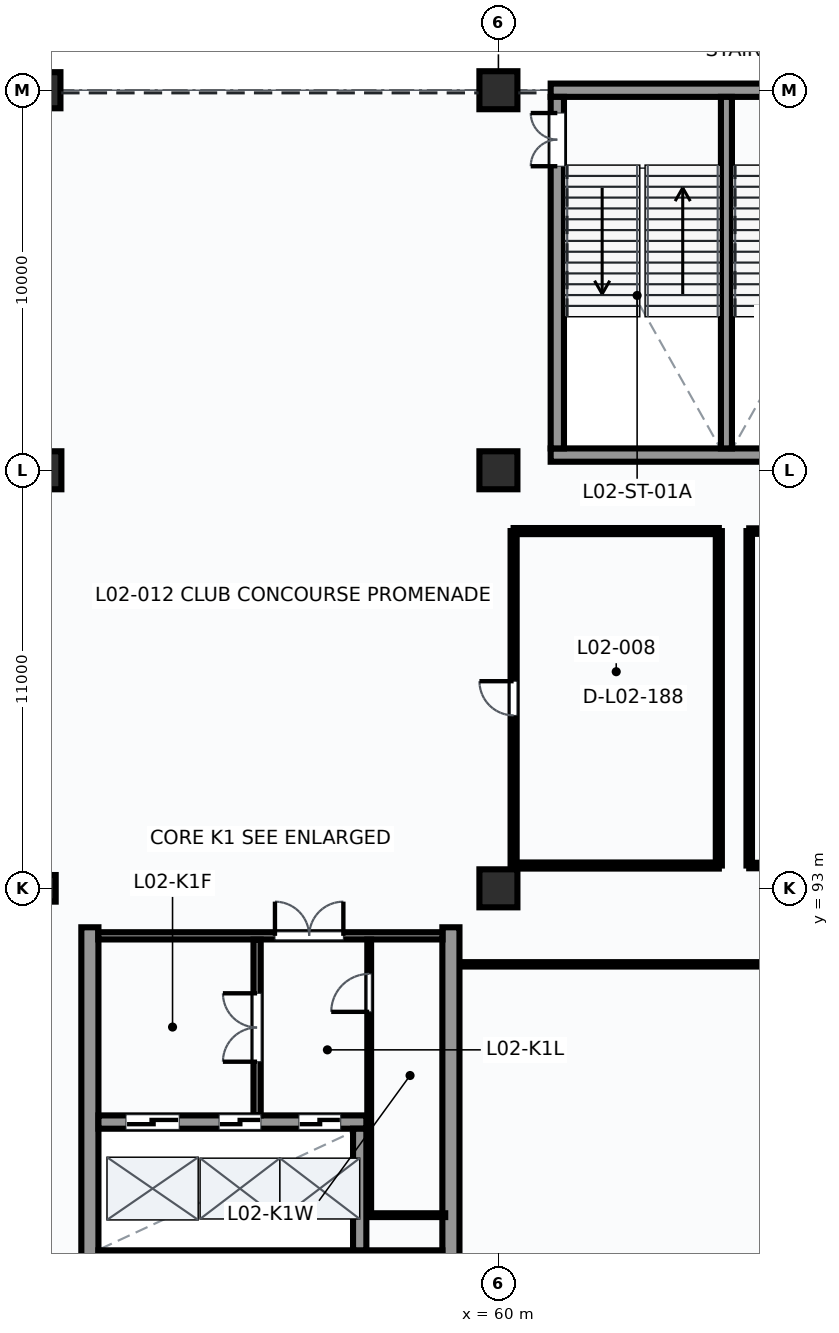
"""IFC4 building model, lengths in metres.
Left out: names, types, materials, properties, quantities, classifications, styles, units other than length and angle.
Written with IfcOpenShell. Run it as: python <this file> out.ifc"""

import sys

from ifc_helpers import new_model, si_unit, direction, frame, frame_2d, origin, origin_2d, place, context, subcontext, project, spatial, rectangle, extrude, element, fill, save


model = new_model("IFC4")
c1 = context("Model", 3, precision=1e-05, world=origin(), true_north=direction((0.0, 1.0)))
c2 = subcontext(c1, "Body", "Model", "MODEL_VIEW")
j1 = project(units=[si_unit("LENGTHUNIT", "METRE"), si_unit("PLANEANGLEUNIT", "RADIAN")], contexts=[c1])
p1 = place(None, origin())
s1 = spatial("IfcSite", under=j1, at=p1, CompositionType="ELEMENT")
p2 = place(p1, origin())
s2 = spatial("IfcBuilding", under=s1, at=p2, CompositionType="ELEMENT")
p3 = place(p2, frame((0.0, 0.0, 10.2)))
s3 = spatial("IfcBuildingStorey", under=s2, at=p3, CompositionType="ELEMENT", Elevation=10.2)
p4 = place(p3, frame((48.0, 93.0, 0.0), z_axis=(0.0, 0.0, 1.0), x_axis=(1.0, 0.0, 0.0)))
e1 = element("IfcColumn", 1, at=p4, inside=s3, PredefinedType="COLUMN", context=c2, shape_type="SweptSolid", body=[
    extrude(rectangle(XDim=0.7, YDim=0.7, at=origin_2d()), origin(), (0.0, 0.0, 1.0), 4.5),
])
p5 = place(p3, frame((48.0, 104.0, 0.0), z_axis=(0.0, 0.0, 1.0), x_axis=(1.0, 0.0, 0.0)))
e2 = element("IfcColumn", 2, at=p5, inside=s3, PredefinedType="COLUMN", context=c2, shape_type="SweptSolid", body=[
    extrude(rectangle(XDim=1.0, YDim=1.0, at=origin_2d()), origin(), (0.0, 0.0, 1.0), 4.5),
])
p6 = place(p3, frame((48.0, 114.0, 0.0), z_axis=(0.0, 0.0, 1.0), x_axis=(1.0, 0.0, 0.0)))
e3 = element("IfcColumn", 3, at=p6, inside=s3, PredefinedType="COLUMN", context=c2, shape_type="SweptSolid", body=[
    extrude(rectangle(XDim=0.95, YDim=0.95, at=origin_2d()), origin(), (0.0, 0.0, 1.0), 4.5),
])
for number, where, z_axis, x_axis in (
    (4, (60.0, 93.0, 0.0), (0.0, 0.0, 1.0), (1.0, 0.0, 0.0)),
    (5, (60.0, 104.0, 0.0), (0.0, 0.0, 1.0), (1.0, 0.0, 0.0)),
    (6, (60.0, 114.0, 0.0), (0.0, 0.0, 1.0), (1.0, 0.0, 0.0)),
):
    element("IfcColumn", number, at=place(p3, frame(where, z_axis=z_axis, x_axis=x_axis)), inside=s3, PredefinedType="COLUMN", context=c2, shape_type="SweptSolid", body=[
        extrude(rectangle(XDim=1.0, YDim=1.0, at=origin_2d()), origin(), (0.0, 0.0, 1.0), 4.5),
    ])
p7 = place(p3, frame((61.375, 104.4, 0.0), z_axis=(0.0, 0.0, 1.0), x_axis=(1.0, 0.0, 0.0)))
e7 = element("IfcWall", 7, at=p7, inside=s3, PredefinedType="SHEAR", context=c2, shape_type="SweptSolid", body=[
    extrude(rectangle(XDim=9.25, YDim=0.35, at=frame_2d((4.625, 0.0))), origin(), (0.0, 0.0, 1.0), 4.5),
])
p8 = place(p3, frame((61.375, 114.0, 0.0), z_axis=(0.0, 0.0, 1.0), x_axis=(1.0, 0.0, 0.0)))
e8 = element("IfcWall", 8, at=p8, inside=s3, PredefinedType="SHEAR", context=c2, shape_type="SweptSolid", body=[
    extrude(rectangle(XDim=9.25, YDim=0.35, at=frame_2d((4.625, 0.0))), origin(), (0.0, 0.0, 1.0), 3.586),
])
p9 = place(p3, frame((61.55, 104.575, 0.0), z_axis=(0.0, 0.0, 1.0), x_axis=(0.0, 1.0, 0.0)))
e9 = element("IfcWall", 9, at=p9, inside=s3, PredefinedType="SHEAR", context=c2, shape_type="SweptSolid", body=[
    extrude(rectangle(XDim=9.25, YDim=0.35, at=frame_2d((4.625, 0.0))), origin(), (0.0, 0.0, 1.0), 4.5),
])
p10 = place(p9, frame((7.425, 0.0, 0.0)))
e10 = element("IfcOpeningElement", 10, at=p10, cuts=e9, PredefinedType="OPENING", context=c2, shape_type="SweptSolid", body=[
    extrude(rectangle(XDim=1.4, YDim=2.2, at=frame_2d((0.7, 1.1))), frame((0.0, 0.185, 0.0), z_axis=(0.0, -1.0, 0.0), x_axis=(1.0, 0.0, 0.0)), (0.0, 0.0, 1.0), 0.37),
])
p11 = place(p3, frame((66.0, 104.575, 0.0), z_axis=(0.0, 0.0, 1.0), x_axis=(0.0, 1.0, 0.0)))
e11 = element("IfcWall", 11, at=p11, inside=s3, PredefinedType="SHEAR", context=c2, shape_type="SweptSolid", body=[
    extrude(rectangle(XDim=9.25, YDim=0.29, at=frame_2d((4.625, 0.0))), origin(), (0.0, 0.0, 1.0), 4.5),
])
for number, where, z_axis, x_axis in (
    (12, (49.25, 83.025, 0.0), (0.0, 0.0, 1.0), (0.0, 1.0, 0.0)),
    (13, (58.75, 83.025, 0.0), (0.0, 0.0, 1.0), (0.0, 1.0, 0.0)),
):
    element("IfcWall", number, at=place(p3, frame(where, z_axis=z_axis, x_axis=x_axis)), inside=s3, PredefinedType="SHEAR", context=c2, shape_type="SweptSolid", body=[
        extrude(rectangle(XDim=8.95, YDim=0.45, at=frame_2d((4.475, 0.0))), origin(), (0.0, 0.0, 1.0), 4.5),
    ])
p12 = place(p3, frame((49.475, 83.25, 0.0), z_axis=(0.0, 0.0, 1.0), x_axis=(1.0, 0.0, 0.0)))
e14 = element("IfcWall", 14, at=p12, inside=s3, PredefinedType="SHEAR", context=c2, shape_type="SweptSolid", body=[
    extrude(rectangle(XDim=9.05, YDim=0.45, at=frame_2d((4.525, 0.0))), origin(), (0.0, 0.0, 1.0), 4.5),
])
p13 = place(p3, frame((49.475, 86.85, 0.0), z_axis=(0.0, 0.0, 1.0), x_axis=(1.0, 0.0, 0.0)))
e15 = element("IfcWall", 15, at=p13, inside=s3, PredefinedType="SHEAR", context=c2, shape_type="SweptSolid", body=[
    extrude(rectangle(XDim=7.05, YDim=0.35, at=frame_2d((3.525, 0.0))), origin(), (0.0, 0.0, 1.0), 4.5),
])
p14 = place(p13, frame((0.725, 0.0, 0.0)))
e16 = element("IfcOpeningElement", 16, at=p14, cuts=e15, PredefinedType="OPENING", context=c2, shape_type="SweptSolid", body=[
    extrude(rectangle(XDim=1.4, YDim=2.3, at=frame_2d((0.7, 1.15))), frame((0.0, 0.185, 0.0), z_axis=(0.0, -1.0, 0.0), x_axis=(1.0, 0.0, 0.0)), (0.0, 0.0, 1.0), 0.37),
])
p15 = place(p13, frame((3.175, 0.0, 0.0)))
e17 = element("IfcOpeningElement", 17, at=p15, cuts=e15, PredefinedType="OPENING", context=c2, shape_type="SweptSolid", body=[
    extrude(rectangle(XDim=1.1, YDim=2.2, at=frame_2d((0.55, 1.1))), frame((0.0, 0.185, 0.0), z_axis=(0.0, -1.0, 0.0), x_axis=(1.0, 0.0, 0.0)), (0.0, 0.0, 1.0), 0.37),
])
p16 = place(p13, frame((5.275, 0.0, 0.0)))
e18 = element("IfcOpeningElement", 18, at=p16, cuts=e15, PredefinedType="OPENING", context=c2, shape_type="SweptSolid", body=[
    extrude(rectangle(XDim=1.1, YDim=2.2, at=frame_2d((0.55, 1.1))), frame((0.0, 0.185, 0.0), z_axis=(0.0, -1.0, 0.0), x_axis=(1.0, 0.0, 0.0)), (0.0, 0.0, 1.0), 0.37),
])
p17 = place(p3, frame((56.35, 83.475, 0.0), z_axis=(0.0, 0.0, 1.0), x_axis=(0.0, 1.0, 0.0)))
e19 = element("IfcWall", 19, at=p17, inside=s3, PredefinedType="SHEAR", context=c2, shape_type="SweptSolid", body=[
    extrude(rectangle(XDim=3.2, YDim=0.35, at=frame_2d((1.6, 0.0))), origin(), (0.0, 0.0, 1.0), 4.5),
])
p18 = place(p3, frame((49.47, 91.75, 0.0), z_axis=(0.0, 0.0, 1.0), x_axis=(1.0, 0.0, 0.0)))
e20 = element("IfcWall", 20, at=p18, inside=s3, PredefinedType="PARTITIONING", context=c2, shape_type="SweptSolid", body=[
    extrude(rectangle(XDim=9.06, YDim=0.19, at=frame_2d((4.53, 0.0))), origin(), (0.0, 0.0, 1.0), 4.15),
])
p19 = place(p18, frame((4.65, 0.0, 0.0)))
e21 = element("IfcOpeningElement", 21, at=p19, cuts=e20, PredefinedType="OPENING", context=c2, shape_type="SweptSolid", body=[
    extrude(rectangle(XDim=1.8, YDim=2.3, at=frame_2d((0.9, 1.15))), frame((0.0, 0.105, 0.0), z_axis=(0.0, -1.0, 0.0), x_axis=(1.0, 0.0, 0.0)), (0.0, 0.0, 1.0), 0.21),
])
p20 = place(p3, frame((53.65, 87.025, 0.0), z_axis=(0.0, 0.0, 1.0), x_axis=(0.0, 1.0, 0.0)))
e22 = element("IfcWall", 22, at=p20, inside=s3, PredefinedType="PARTITIONING", context=c2, shape_type="SweptSolid", body=[
    extrude(rectangle(XDim=4.625, YDim=0.19, at=frame_2d((2.312, 0.0))), origin(), (0.0, 0.0, 1.0), 4.15),
])
p21 = place(p20, frame((1.413, 0.0, 0.0)))
e23 = element("IfcOpeningElement", 23, at=p21, cuts=e22, PredefinedType="OPENING", context=c2, shape_type="SweptSolid", body=[
    extrude(rectangle(XDim=1.8, YDim=2.2, at=frame_2d((0.9, 1.1))), frame((0.0, 0.105, 0.0), z_axis=(0.0, -1.0, 0.0), x_axis=(1.0, 0.0, 0.0)), (0.0, 0.0, 1.0), 0.21),
])
p22 = place(p3, frame((56.6, 84.4, 0.0), z_axis=(0.0, 0.0, 1.0), x_axis=(0.0, 1.0, 0.0)))
e24 = element("IfcWall", 24, at=p22, inside=s3, PredefinedType="PARTITIONING", context=c2, shape_type="SweptSolid", body=[
    extrude(rectangle(XDim=7.25, YDim=0.1, at=frame_2d((3.625, 0.0))), origin(), (0.0, 0.0, 1.0), 4.15),
])
p23 = place(p22, frame((5.35, 0.0, 0.0)))
e25 = element("IfcOpeningElement", 25, at=p23, cuts=e24, PredefinedType="OPENING", context=c2, shape_type="SweptSolid", body=[
    extrude(rectangle(XDim=1.0, YDim=2.1, at=frame_2d((0.5, 1.05))), frame((0.0, 0.06, 0.0), z_axis=(0.0, -1.0, 0.0), x_axis=(1.0, 0.0, 0.0)), (0.0, 0.0, 1.0), 0.12),
])
p24 = place(p3, frame((56.6, 84.4, 0.0), z_axis=(0.0, 0.0, 1.0), x_axis=(1.0, 0.0, 0.0)))
e26 = element("IfcWall", 26, at=p24, inside=s3, PredefinedType="PARTITIONING", context=c2, shape_type="SweptSolid", body=[
    extrude(rectangle(XDim=2.0, YDim=0.1, at=frame_2d((1.0, 0.0))), origin(), (0.0, 0.0, 1.0), 4.15),
])
p25 = place(p3, frame((59.0, 91.0, 0.0), z_axis=(0.0, 0.0, 1.0), x_axis=(1.0, 0.0, 0.0)))
e27 = element("IfcWall", 27, at=p25, inside=s3, PredefinedType="PARTITIONING", context=c2, shape_type="SweptSolid", body=[
    extrude(rectangle(XDim=9.0, YDim=0.115, at=frame_2d((4.5, 0.0))), origin(), (0.0, 0.0, 1.0), 3.13),
])
p26 = place(p3, frame((65.8, 102.4, 0.0), z_axis=(0.0, 0.0, 1.0), x_axis=(0.0, -1.0, 0.0)))
e28 = element("IfcWall", 28, at=p26, inside=s3, PredefinedType="PARTITIONING", context=c2, shape_type="SweptSolid", body=[
    extrude(rectangle(XDim=8.8, YDim=0.16, at=frame_2d((4.4, 0.0))), origin(), (0.0, 0.0, 1.0), 3.82),
])
p27 = place(p3, frame((65.8, 93.6, 0.0), z_axis=(0.0, 0.0, 1.0), x_axis=(-1.0, 0.0, 0.0)))
e29 = element("IfcWall", 29, at=p27, inside=s3, PredefinedType="PARTITIONING", context=c2, shape_type="SweptSolid", body=[
    extrude(rectangle(XDim=5.4, YDim=0.16, at=frame_2d((2.7, 0.0))), origin(), (0.0, 0.0, 1.0), 4.15),
])
p28 = place(p3, frame((60.4, 93.6, 0.0), z_axis=(0.0, 0.0, 1.0), x_axis=(0.0, 1.0, 0.0)))
e30 = element("IfcWall", 30, at=p28, inside=s3, PredefinedType="PARTITIONING", context=c2, shape_type="SweptSolid", body=[
    extrude(rectangle(XDim=8.8, YDim=0.16, at=frame_2d((4.4, 0.0))), origin(), (0.0, 0.0, 1.0), 3.82),
])
p29 = place(p28, frame((3.95, 0.0, 0.0)))
e31 = element("IfcOpeningElement", 31, at=p29, cuts=e30, PredefinedType="OPENING", context=c2, shape_type="SweptSolid", body=[
    extrude(rectangle(XDim=0.9, YDim=2.1, at=frame_2d((0.45, 1.05))), frame((0.0, 0.09, 0.0), z_axis=(0.0, -1.0, 0.0), x_axis=(1.0, 0.0, 0.0)), (0.0, 0.0, 1.0), 0.18),
])
p30 = place(p3, frame((60.4, 102.4, 0.0), z_axis=(0.0, 0.0, 1.0), x_axis=(1.0, 0.0, 0.0)))
e32 = element("IfcWall", 32, at=p30, inside=s3, PredefinedType="PARTITIONING", context=c2, shape_type="SweptSolid", body=[
    extrude(rectangle(XDim=5.4, YDim=0.16, at=frame_2d((2.7, 0.0))), origin(), (0.0, 0.0, 1.0), 4.15),
])
p31 = place(p3, frame((72.0, 93.6, 0.0), z_axis=(0.0, 0.0, 1.0), x_axis=(-1.0, 0.0, 0.0)))
e33 = element("IfcWall", 33, at=p31, inside=s3, PredefinedType="PARTITIONING", context=c2, shape_type="SweptSolid", body=[
    extrude(rectangle(XDim=5.4, YDim=0.145, at=frame_2d((2.7, 0.0))), origin(), (0.0, 0.0, 1.0), 3.38),
])
p32 = place(p31, frame((2.25, 0.0, 0.0)))
e34 = element("IfcOpeningElement", 34, at=p32, cuts=e33, PredefinedType="OPENING", context=c2, shape_type="SweptSolid", body=[
    extrude(rectangle(XDim=0.9, YDim=2.1, at=frame_2d((0.45, 1.05))), frame((0.0, 0.083, 0.0), z_axis=(0.0, -1.0, 0.0), x_axis=(1.0, 0.0, 0.0)), (0.0, 0.0, 1.0), 0.165),
])
p33 = place(p3, frame((66.6, 93.6, 0.0), z_axis=(0.0, 0.0, 1.0), x_axis=(0.0, 1.0, 0.0)))
e35 = element("IfcWall", 35, at=p33, inside=s3, PredefinedType="PARTITIONING", context=c2, shape_type="SweptSolid", body=[
    extrude(rectangle(XDim=8.8, YDim=0.145, at=frame_2d((4.4, 0.0))), origin(), (0.0, 0.0, 1.0), 3.82),
])
p34 = place(p3, frame((66.6, 102.4, 0.0), z_axis=(0.0, 0.0, 1.0), x_axis=(1.0, 0.0, 0.0)))
e36 = element("IfcWall", 36, at=p34, inside=s3, PredefinedType="PARTITIONING", context=c2, shape_type="SweptSolid", body=[
    extrude(rectangle(XDim=5.4, YDim=0.145, at=frame_2d((2.7, 0.0))), origin(), (0.0, 0.0, 1.0), 3.38),
])
p35 = place(p10, frame((1.4, 0.0, 0.0), z_axis=(0.0, 0.0, 1.0), x_axis=(-1.0, 0.0, 0.0)))
e37 = element("IfcDoor", 37, at=p35, inside=s3, OperationType="DOUBLE_DOOR_SINGLE_SWING", PredefinedType="DOOR", context=c2, shape_type="SweptSolid", body=[
    extrude(rectangle(XDim=1.4, YDim=2.2, at=frame_2d((0.7, 1.1))), frame((0.0, 0.025, 0.0), z_axis=(0.0, -1.0, 0.0), x_axis=(1.0, 0.0, 0.0)), (0.0, 0.0, 1.0), 0.05),
])
fill(e10, e37)
p36 = place(p14, origin())
e38 = element("IfcDoor", 38, at=p36, inside=s3, OperationType="SLIDING_TO_LEFT", PredefinedType="DOOR", context=c2, shape_type="SweptSolid", body=[
    extrude(rectangle(XDim=1.4, YDim=2.3, at=frame_2d((0.7, 1.15))), frame((0.0, 0.025, 0.0), z_axis=(0.0, -1.0, 0.0), x_axis=(1.0, 0.0, 0.0)), (0.0, 0.0, 1.0), 0.05),
])
fill(e16, e38)
p37 = place(p15, origin())
e39 = element("IfcDoor", 39, at=p37, inside=s3, OperationType="SLIDING_TO_LEFT", PredefinedType="DOOR", context=c2, shape_type="SweptSolid", body=[
    extrude(rectangle(XDim=1.1, YDim=2.2, at=frame_2d((0.55, 1.1))), frame((0.0, 0.025, 0.0), z_axis=(0.0, -1.0, 0.0), x_axis=(1.0, 0.0, 0.0)), (0.0, 0.0, 1.0), 0.05),
])
fill(e17, e39)
p38 = place(p16, origin())
e40 = element("IfcDoor", 40, at=p38, inside=s3, OperationType="SLIDING_TO_LEFT", PredefinedType="DOOR", context=c2, shape_type="SweptSolid", body=[
    extrude(rectangle(XDim=1.1, YDim=2.2, at=frame_2d((0.55, 1.1))), frame((0.0, 0.025, 0.0), z_axis=(0.0, -1.0, 0.0), x_axis=(1.0, 0.0, 0.0)), (0.0, 0.0, 1.0), 0.05),
])
fill(e18, e40)
p39 = place(p19, origin())
e41 = element("IfcDoor", 41, at=p39, inside=s3, OperationType="DOUBLE_DOOR_SINGLE_SWING", PredefinedType="DOOR", context=c2, shape_type="SweptSolid", body=[
    extrude(rectangle(XDim=1.8, YDim=2.3, at=frame_2d((0.9, 1.15))), frame((0.0, 0.025, 0.0), z_axis=(0.0, -1.0, 0.0), x_axis=(1.0, 0.0, 0.0)), (0.0, 0.0, 1.0), 0.05),
])
fill(e21, e41)
p40 = place(p21, origin())
e42 = element("IfcDoor", 42, at=p40, inside=s3, OperationType="DOUBLE_DOOR_SINGLE_SWING", PredefinedType="DOOR", context=c2, shape_type="SweptSolid", body=[
    extrude(rectangle(XDim=1.8, YDim=2.2, at=frame_2d((0.9, 1.1))), frame((0.0, 0.025, 0.0), z_axis=(0.0, -1.0, 0.0), x_axis=(1.0, 0.0, 0.0)), (0.0, 0.0, 1.0), 0.05),
])
fill(e23, e42)
p41 = place(p23, origin())
e43 = element("IfcDoor", 43, at=p41, inside=s3, OperationType="SINGLE_SWING_LEFT", PredefinedType="DOOR", context=c2, shape_type="SweptSolid", body=[
    extrude(rectangle(XDim=1.0, YDim=2.1, at=frame_2d((0.5, 1.05))), frame((0.0, 0.025, 0.0), z_axis=(0.0, -1.0, 0.0), x_axis=(1.0, 0.0, 0.0)), (0.0, 0.0, 1.0), 0.05),
])
fill(e25, e43)
p42 = place(p29, origin())
e44 = element("IfcDoor", 44, at=p42, inside=s3, OperationType="SINGLE_SWING_RIGHT", PredefinedType="DOOR", context=c2, shape_type="SweptSolid", body=[
    extrude(rectangle(XDim=0.9, YDim=2.1, at=frame_2d((0.45, 1.05))), frame((0.0, 0.025, 0.0), z_axis=(0.0, -1.0, 0.0), x_axis=(1.0, 0.0, 0.0)), (0.0, 0.0, 1.0), 0.05),
])
fill(e31, e44)
save(model, sys.argv[1])
